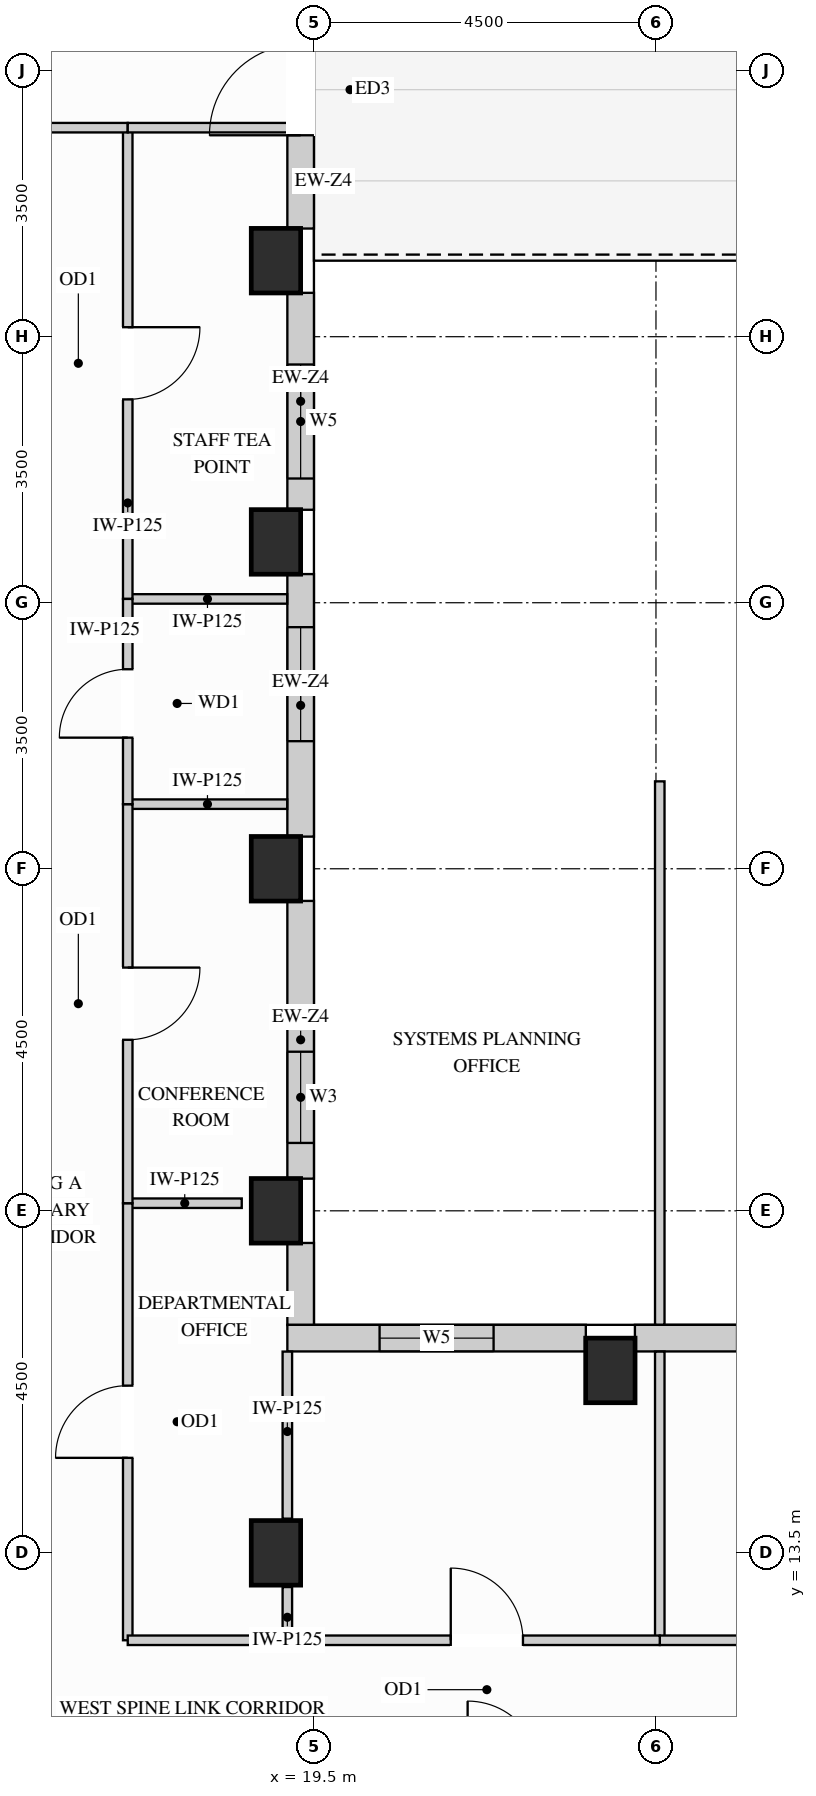
"""IFC4 building model, lengths in metres.
Left out: names, types, materials, properties, quantities, classifications, styles, units other than length and angle.
Written with IfcOpenShell. Run it as: python <this file> out.ifc"""

import sys

from ifc_helpers import new_model, si_unit, direction, frame, frame_2d, origin, origin_2d, place, context, subcontext, project, spatial, rectangle, extrude, source, transform, mapped, element, fill, save


model = new_model("IFC4")
c1 = context("Model", 3, precision=1e-05, world=origin(), true_north=direction((0.0, 1.0)))
c2 = subcontext(c1, "Body", "Model", "MODEL_VIEW")
j1 = project(units=[si_unit("LENGTHUNIT", "METRE"), si_unit("PLANEANGLEUNIT", "RADIAN")], contexts=[c1])
p1 = place(None, origin())
s1 = spatial("IfcSite", under=j1, at=p1, CompositionType="ELEMENT")
p2 = place(p1, origin())
s2 = spatial("IfcBuilding", under=s1, at=p2, CompositionType="ELEMENT")
p3 = place(p2, frame((0.0, 0.0, 237.6)))
s3 = spatial("IfcBuildingStorey", under=s2, at=p3, CompositionType="ELEMENT", Elevation=237.6)
m1 = source(origin(), c2, "Body", "SweptSolid", [
    extrude(rectangle(XDim=0.65, YDim=0.85, at=origin_2d()), origin(), (0.0, 0.0, 1.0), 3.4),
])
for number, where, z_axis, x_axis in (
    (1, (19.0, 13.5, 0.0), (0.0, 0.0, 1.0), (1.0, 0.0, 0.0)),
    (2, (19.0, 18.0, 0.0), (0.0, 0.0, 1.0), (1.0, 0.0, 0.0)),
    (3, (19.0, 22.5, 0.0), (0.0, 0.0, 1.0), (1.0, 0.0, 0.0)),
    (4, (19.0, 26.8, 0.0), (0.0, 0.0, 1.0), (1.0, 0.0, 0.0)),
    (5, (19.0, 30.5, 0.0), (0.0, 0.0, 1.0), (1.0, 0.0, 0.0)),
    (6, (23.4, 15.9, 0.0), (0.0, 0.0, 1.0), (1.0, 0.0, 0.0)),
):
    element("IfcColumn", number, at=place(p3, frame(where, z_axis=z_axis, x_axis=x_axis)), inside=s3, PredefinedType="COLUMN", context=c2, shape_type="MappedRepresentation", body=[
        mapped(m1, transform((0.0, 0.0, 0.0), x_axis=(1.0, 0.0, 0.0), y_axis=(0.0, 1.0, 0.0), z_axis=(0.0, 0.0, 1.0))),
    ])
m2 = source(origin(), c2, "Body", "SweptSolid", [
    extrude(rectangle(XDim=1.079, YDim=0.35, at=frame_2d((0.54, 0.0))), origin(), (0.0, 0.0, 1.0), 2.619),
])
p4 = place(p3, frame((19.325, 16.498, 0.0), z_axis=(0.0, 0.0, 1.0), x_axis=(0.0, 1.0, 0.0)))
e7 = element("IfcWall", 7, at=p4, inside=s3, PredefinedType="SOLIDWALL", context=c2, shape_type="MappedRepresentation", body=[
    mapped(m2, transform((0.0, 0.0, 0.0), x_axis=(1.0, 0.0, 0.0), y_axis=(0.0, 1.0, 0.0), z_axis=(0.0, 0.0, 1.0))),
])
p5 = place(p3, frame((19.325, 18.423, 0.0), z_axis=(0.0, 0.0, 1.0), x_axis=(0.0, 1.0, 0.0)))
e8 = element("IfcWall", 8, at=p5, inside=s3, PredefinedType="SOLIDWALL", context=c2, shape_type="SweptSolid", body=[
    extrude(rectangle(XDim=3.654, YDim=0.35, at=frame_2d((1.827, 0.0))), origin(), (0.0, 0.0, 1.0), 2.619),
])
p6 = place(p5, frame((0.47, 0.0, 0.78)))
e9 = element("IfcOpeningElement", 9, at=p6, cuts=e8, PredefinedType="OPENING", context=c2, shape_type="SweptSolid", body=[
    extrude(rectangle(XDim=1.2, YDim=1.659, at=frame_2d((0.6, 0.83))), frame((0.0, 0.185, 0.0), z_axis=(0.0, -1.0, 0.0), x_axis=(1.0, 0.0, 0.0)), (0.0, 0.0, 1.0), 0.37),
])
p7 = place(p3, frame((19.325, 22.923, 0.0), z_axis=(0.0, 0.0, 1.0), x_axis=(0.0, 1.0, 0.0)))
e10 = element("IfcWall", 10, at=p7, inside=s3, PredefinedType="SOLIDWALL", context=c2, shape_type="SweptSolid", body=[
    extrude(rectangle(XDim=3.454, YDim=0.35, at=frame_2d((1.727, 0.0))), origin(), (0.0, 0.0, 1.0), 2.619),
])
p8 = place(p7, frame((1.256, 0.0, 0.78)))
e11 = element("IfcOpeningElement", 11, at=p8, cuts=e10, PredefinedType="OPENING", context=c2, shape_type="SweptSolid", body=[
    extrude(rectangle(XDim=1.5, YDim=1.659, at=frame_2d((0.75, 0.83))), frame((0.0, 0.185, 0.0), z_axis=(0.0, -1.0, 0.0), x_axis=(1.0, 0.0, 0.0)), (0.0, 0.0, 1.0), 0.37),
])
p9 = place(p3, frame((19.325, 27.223, 0.0), z_axis=(0.0, 0.0, 1.0), x_axis=(0.0, 1.0, 0.0)))
e12 = element("IfcWall", 12, at=p9, inside=s3, PredefinedType="SOLIDWALL", context=c2, shape_type="SweptSolid", body=[
    extrude(rectangle(XDim=2.854, YDim=0.35, at=frame_2d((1.427, 0.0))), origin(), (0.0, 0.0, 1.0), 2.619),
])
p10 = place(p9, frame((0.411, 0.0, 0.78)))
e13 = element("IfcOpeningElement", 13, at=p10, cuts=e12, PredefinedType="OPENING", context=c2, shape_type="SweptSolid", body=[
    extrude(rectangle(XDim=1.5, YDim=1.659, at=frame_2d((0.75, 0.83))), frame((0.0, 0.185, 0.0), z_axis=(0.0, -1.0, 0.0), x_axis=(1.0, 0.0, 0.0)), (0.0, 0.0, 1.0), 0.37),
])
p11 = place(p3, frame((19.325, 30.923, 0.0), z_axis=(0.0, 0.0, 1.0), x_axis=(0.0, 1.0, 0.0)))
e14 = element("IfcWall", 14, at=p11, inside=s3, PredefinedType="SOLIDWALL", context=c2, shape_type="SweptSolid", body=[
    extrude(rectangle(XDim=3.654, YDim=0.35, at=frame_2d((1.827, 0.0))), origin(), (0.0, 0.0, 1.0), 2.619),
])
p12 = place(p11, frame((1.227, 0.0, 0.0)))
e15 = element("IfcOpeningElement", 15, at=p12, cuts=e14, PredefinedType="OPENING", context=c2, shape_type="SweptSolid", body=[
    extrude(rectangle(XDim=1.2, YDim=2.15, at=frame_2d((0.6, 1.075))), frame((0.0, 0.185, 0.0), z_axis=(0.0, -1.0, 0.0), x_axis=(1.0, 0.0, 0.0)), (0.0, 0.0, 1.0), 0.37),
])
p13 = place(p3, frame((30.177, 16.325, 0.0), z_axis=(0.0, 0.0, 1.0), x_axis=(-1.0, 0.0, 0.0)))
e16 = element("IfcWall", 16, at=p13, inside=s3, PredefinedType="SOLIDWALL", context=c2, shape_type="SweptSolid", body=[
    extrude(rectangle(XDim=6.454, YDim=0.35, at=frame_2d((3.227, 0.0))), origin(), (0.0, 0.0, 1.0), 3.385),
])
p14 = place(p13, frame((1.344, 0.0, 0.78)))
e17 = element("IfcOpeningElement", 17, at=p14, cuts=e16, PredefinedType="OPENING", context=c2, shape_type="SweptSolid", body=[
    extrude(rectangle(XDim=1.5, YDim=2.0, at=frame_2d((0.75, 1.0))), frame((0.0, 0.185, 0.0), z_axis=(0.0, -1.0, 0.0), x_axis=(1.0, 0.0, 0.0)), (0.0, 0.0, 1.0), 0.37),
])
p15 = place(p13, frame((3.61, 0.0, 0.78)))
e18 = element("IfcOpeningElement", 18, at=p15, cuts=e16, PredefinedType="OPENING", context=c2, shape_type="SweptSolid", body=[
    extrude(rectangle(XDim=1.5, YDim=2.0, at=frame_2d((0.75, 1.0))), frame((0.0, 0.185, 0.0), z_axis=(0.0, -1.0, 0.0), x_axis=(1.0, 0.0, 0.0)), (0.0, 0.0, 1.0), 0.37),
])
p16 = place(p3, frame((23.077, 16.325, 0.0), z_axis=(0.0, 0.0, 1.0), x_axis=(-1.0, 0.0, 0.0)))
e19 = element("IfcWall", 19, at=p16, inside=s3, PredefinedType="SOLIDWALL", context=c2, shape_type="SweptSolid", body=[
    extrude(rectangle(XDim=3.927, YDim=0.35, at=frame_2d((1.963, 0.0))), origin(), (0.0, 0.0, 1.0), 3.385),
])
p17 = place(p16, frame((1.213, 0.0, 0.78)))
e20 = element("IfcOpeningElement", 20, at=p17, cuts=e19, PredefinedType="OPENING", context=c2, shape_type="SweptSolid", body=[
    extrude(rectangle(XDim=1.5, YDim=2.0, at=frame_2d((0.75, 1.0))), frame((0.0, 0.185, 0.0), z_axis=(0.0, -1.0, 0.0), x_axis=(1.0, 0.0, 0.0)), (0.0, 0.0, 1.0), 0.37),
])
m3 = source(origin(), c2, "Body", "SweptSolid", [
    extrude(rectangle(XDim=1.5, YDim=0.125, at=frame_2d((0.75, 0.0))), origin(), (0.0, 0.0, 1.0), 2.773),
])
p18 = place(p3, frame((17.05, 18.1, 0.0), z_axis=(0.0, 0.0, 1.0), x_axis=(1.0, 0.0, 0.0)))
e21 = element("IfcWall", 21, at=p18, inside=s3, PredefinedType="PARTITIONING", context=c2, shape_type="MappedRepresentation", body=[
    mapped(m3, transform((0.0, 0.0, 0.0), x_axis=(1.0, 0.0, 0.0), y_axis=(0.0, 1.0, 0.0), z_axis=(0.0, 0.0, 1.0))),
])
m4 = source(origin(), c2, "Body", "SweptSolid", [
    extrude(rectangle(XDim=2.098, YDim=0.125, at=frame_2d((1.049, 0.0))), origin(), (0.0, 0.0, 1.0), 3.385),
])
for number, where, z_axis, x_axis in (
    (22, (17.05, 23.35, 0.0), (0.0, 0.0, 1.0), (1.0, 0.0, 0.0)),
    (23, (17.05, 26.05, 0.0), (0.0, 0.0, 1.0), (1.0, 0.0, 0.0)),
):
    element("IfcWall", number, at=place(p3, frame(where, z_axis=z_axis, x_axis=x_axis)), inside=s3, PredefinedType="PARTITIONING", context=c2, shape_type="MappedRepresentation", body=[
        mapped(m4, transform((0.0, 0.0, 0.0), x_axis=(1.0, 0.0, 0.0), y_axis=(0.0, 1.0, 0.0), z_axis=(0.0, 0.0, 1.0))),
    ])
m5 = source(origin(), c2, "Body", "SweptSolid", [
    extrude(rectangle(XDim=0.7, YDim=0.125, at=frame_2d((0.35, 0.0))), origin(), (0.0, 0.0, 1.0), 2.773),
])
p19 = place(p3, frame((19.15, 12.35, 0.0), z_axis=(0.0, 0.0, 1.0), x_axis=(0.0, 1.0, 0.0)))
e24 = element("IfcWall", 24, at=p19, inside=s3, PredefinedType="PARTITIONING", context=c2, shape_type="MappedRepresentation", body=[
    mapped(m5, transform((0.0, 0.0, 0.0), x_axis=(1.0, 0.0, 0.0), y_axis=(0.0, 1.0, 0.0), z_axis=(0.0, 0.0, 1.0))),
])
m6 = source(origin(), c2, "Body", "SweptSolid", [
    extrude(rectangle(XDim=2.198, YDim=0.125, at=frame_2d((1.099, 0.0))), origin(), (0.0, 0.0, 1.0), 2.619),
])
p20 = place(p3, frame((19.15, 13.95, 0.0), z_axis=(0.0, 0.0, 1.0), x_axis=(0.0, 1.0, 0.0)))
e25 = element("IfcWall", 25, at=p20, inside=s3, PredefinedType="PARTITIONING", context=c2, shape_type="MappedRepresentation", body=[
    mapped(m6, transform((0.0, 0.0, 0.0), x_axis=(1.0, 0.0, 0.0), y_axis=(0.0, 1.0, 0.0), z_axis=(0.0, 0.0, 1.0))),
])
p21 = place(p3, frame((17.05, 12.35, 0.0), z_axis=(0.0, 0.0, 1.0), x_axis=(0.0, 1.0, 0.0)))
e26 = element("IfcWall", 26, at=p21, inside=s3, PredefinedType="PARTITIONING", context=c2, shape_type="SweptSolid", body=[
    extrude(rectangle(XDim=5.75, YDim=0.125, at=frame_2d((2.875, 0.0))), origin(), (0.0, 0.0, 1.0), 3.385),
])
p22 = place(p21, frame((2.4, 0.0, 0.0)))
e27 = element("IfcOpeningElement", 27, at=p22, cuts=e26, PredefinedType="OPENING", context=c2, shape_type="SweptSolid", body=[
    extrude(rectangle(XDim=0.95, YDim=2.15, at=frame_2d((0.475, 1.075))), frame((0.0, 0.073, 0.0), z_axis=(0.0, -1.0, 0.0), x_axis=(1.0, 0.0, 0.0)), (0.0, 0.0, 1.0), 0.145),
])
p23 = place(p3, frame((17.05, 18.1, 0.0), z_axis=(0.0, 0.0, 1.0), x_axis=(0.0, 1.0, 0.0)))
e28 = element("IfcWall", 28, at=p23, inside=s3, PredefinedType="PARTITIONING", context=c2, shape_type="SweptSolid", body=[
    extrude(rectangle(XDim=5.25, YDim=0.125, at=frame_2d((2.625, 0.0))), origin(), (0.0, 0.0, 1.0), 3.385),
])
p24 = place(p23, frame((2.15, 0.0, 0.0)))
e29 = element("IfcOpeningElement", 29, at=p24, cuts=e28, PredefinedType="OPENING", context=c2, shape_type="SweptSolid", body=[
    extrude(rectangle(XDim=0.95, YDim=2.15, at=frame_2d((0.475, 1.075))), frame((0.0, 0.073, 0.0), z_axis=(0.0, -1.0, 0.0), x_axis=(1.0, 0.0, 0.0)), (0.0, 0.0, 1.0), 0.145),
])
p25 = place(p3, frame((17.05, 26.05, 0.0), z_axis=(0.0, 0.0, 1.0), x_axis=(0.0, 1.0, 0.0)))
e30 = element("IfcWall", 30, at=p25, inside=s3, PredefinedType="PARTITIONING", context=c2, shape_type="SweptSolid", body=[
    extrude(rectangle(XDim=6.2, YDim=0.125, at=frame_2d((3.1, 0.0))), origin(), (0.0, 0.0, 1.0), 3.385),
])
p26 = place(p25, frame((2.625, 0.0, 0.0)))
e31 = element("IfcOpeningElement", 31, at=p26, cuts=e30, PredefinedType="OPENING", context=c2, shape_type="SweptSolid", body=[
    extrude(rectangle(XDim=0.95, YDim=2.15, at=frame_2d((0.475, 1.075))), frame((0.0, 0.073, 0.0), z_axis=(0.0, -1.0, 0.0), x_axis=(1.0, 0.0, 0.0)), (0.0, 0.0, 1.0), 0.145),
])
p27 = place(p3, frame((17.05, 23.35, 0.0), z_axis=(0.0, 0.0, 1.0), x_axis=(0.0, 1.0, 0.0)))
e32 = element("IfcWall", 32, at=p27, inside=s3, PredefinedType="PARTITIONING", context=c2, shape_type="SweptSolid", body=[
    extrude(rectangle(XDim=2.7, YDim=0.125, at=frame_2d((1.35, 0.0))), origin(), (0.0, 0.0, 1.0), 3.385),
])
p28 = place(p27, frame((0.875, 0.0, 0.0)))
e33 = element("IfcOpeningElement", 33, at=p28, cuts=e32, PredefinedType="OPENING", context=c2, shape_type="SweptSolid", body=[
    extrude(rectangle(XDim=0.9, YDim=2.15, at=frame_2d((0.45, 1.075))), frame((0.0, 0.073, 0.0), z_axis=(0.0, -1.0, 0.0), x_axis=(1.0, 0.0, 0.0)), (0.0, 0.0, 1.0), 0.145),
])
p29 = place(p3, frame((11.916, 32.25, 0.0), z_axis=(0.0, 0.0, 1.0), x_axis=(1.0, 0.0, 0.0)))
e34 = element("IfcWall", 34, at=p29, inside=s3, PredefinedType="PARTITIONING", context=c2, shape_type="SweptSolid", body=[
    extrude(rectangle(XDim=5.134, YDim=0.125, at=frame_2d((2.567, 0.0))), origin(), (0.0, 0.0, 1.0), 3.385),
])
p30 = place(p29, frame((2.092, 0.0, 0.0)))
e35 = element("IfcOpeningElement", 35, at=p30, cuts=e34, PredefinedType="OPENING", context=c2, shape_type="SweptSolid", body=[
    extrude(rectangle(XDim=0.95, YDim=2.15, at=frame_2d((0.475, 1.075))), frame((0.0, 0.073, 0.0), z_axis=(0.0, -1.0, 0.0), x_axis=(1.0, 0.0, 0.0)), (0.0, 0.0, 1.0), 0.145),
])
p31 = place(p3, frame((17.05, 32.25, 0.0), z_axis=(0.0, 0.0, 1.0), x_axis=(1.0, 0.0, 0.0)))
e36 = element("IfcWall", 36, at=p31, inside=s3, PredefinedType="PARTITIONING", context=c2, shape_type="MappedRepresentation", body=[
    mapped(m4, transform((0.0, 0.0, 0.0), x_axis=(1.0, 0.0, 0.0), y_axis=(0.0, 1.0, 0.0), z_axis=(0.0, 0.0, 1.0))),
])
m7 = source(origin(), c2, "Body", "SweptSolid", [
    extrude(rectangle(XDim=3.798, YDim=0.125, at=frame_2d((1.899, 0.0))), origin(), (0.0, 0.0, 1.0), 3.385),
])
p32 = place(p3, frame((24.05, 12.35, 0.0), z_axis=(0.0, 0.0, 1.0), x_axis=(0.0, 1.0, 0.0)))
e37 = element("IfcWall", 37, at=p32, inside=s3, PredefinedType="PARTITIONING", context=c2, shape_type="MappedRepresentation", body=[
    mapped(m7, transform((0.0, 0.0, 0.0), x_axis=(1.0, 0.0, 0.0), y_axis=(0.0, 1.0, 0.0), z_axis=(0.0, 0.0, 1.0))),
])
m8 = source(origin(), c2, "Body", "SweptSolid", [
    extrude(rectangle(XDim=7.148, YDim=0.125, at=frame_2d((3.574, 0.0))), origin(), (0.0, 0.0, 1.0), 3.385),
])
p33 = place(p3, frame((24.05, 16.502, 0.0), z_axis=(0.0, 0.0, 1.0), x_axis=(0.0, 1.0, 0.0)))
e38 = element("IfcWall", 38, at=p33, inside=s3, PredefinedType="PARTITIONING", context=c2, shape_type="MappedRepresentation", body=[
    mapped(m8, transform((0.0, 0.0, 0.0), x_axis=(1.0, 0.0, 0.0), y_axis=(0.0, 1.0, 0.0), z_axis=(0.0, 0.0, 1.0))),
])
p34 = place(p3, frame((24.05, 12.35, 0.0), z_axis=(0.0, 0.0, 1.0), x_axis=(1.0, 0.0, 0.0)))
e39 = element("IfcWall", 39, at=p34, inside=s3, PredefinedType="PARTITIONING", context=c2, shape_type="SweptSolid", body=[
    extrude(rectangle(XDim=5.8, YDim=0.125, at=frame_2d((2.9, 0.0))), origin(), (0.0, 0.0, 1.0), 3.385),
])
p35 = place(p34, frame((2.425, 0.0, 0.0)))
e40 = element("IfcOpeningElement", 40, at=p35, cuts=e39, PredefinedType="OPENING", context=c2, shape_type="SweptSolid", body=[
    extrude(rectangle(XDim=0.95, YDim=2.15, at=frame_2d((0.475, 1.075))), frame((0.0, 0.073, 0.0), z_axis=(0.0, -1.0, 0.0), x_axis=(1.0, 0.0, 0.0)), (0.0, 0.0, 1.0), 0.145),
])
m9 = source(origin(), c2, "Body", "SweptSolid", [
    extrude(rectangle(XDim=2.45, YDim=0.125, at=frame_2d((1.225, 0.0))), origin(), (0.0, 0.0, 1.0), 3.385),
])
p36 = place(p3, frame((17.05, 12.35, 0.0), z_axis=(0.0, 0.0, 1.0), x_axis=(1.0, 0.0, 0.0)))
e41 = element("IfcWall", 41, at=p36, inside=s3, PredefinedType="PARTITIONING", context=c2, shape_type="MappedRepresentation", body=[
    mapped(m9, transform((0.0, 0.0, 0.0), x_axis=(1.0, 0.0, 0.0), y_axis=(0.0, 1.0, 0.0), z_axis=(0.0, 0.0, 1.0))),
])
p37 = place(p3, frame((19.5, 12.35, 0.0), z_axis=(0.0, 0.0, 1.0), x_axis=(1.0, 0.0, 0.0)))
e42 = element("IfcWall", 42, at=p37, inside=s3, PredefinedType="PARTITIONING", context=c2, shape_type="SweptSolid", body=[
    extrude(rectangle(XDim=4.55, YDim=0.125, at=frame_2d((2.275, 0.0))), origin(), (0.0, 0.0, 1.0), 3.385),
])
p38 = place(p37, frame((1.8, 0.0, 0.0)))
e43 = element("IfcOpeningElement", 43, at=p38, cuts=e42, PredefinedType="OPENING", context=c2, shape_type="SweptSolid", body=[
    extrude(rectangle(XDim=0.95, YDim=2.15, at=frame_2d((0.475, 1.075))), frame((0.0, 0.073, 0.0), z_axis=(0.0, -1.0, 0.0), x_axis=(1.0, 0.0, 0.0)), (0.0, 0.0, 1.0), 0.145),
])
m10 = source(origin(), c2, "Body", "SweptSolid", [
    extrude(rectangle(XDim=1.2, YDim=2.15, at=frame_2d((0.6, 1.075))), frame((0.0, 0.025, 0.0), z_axis=(0.0, -1.0, 0.0), x_axis=(1.0, 0.0, 0.0)), (0.0, 0.0, 1.0), 0.05),
])
p39 = place(p12, frame((1.2, 0.0, 0.0), z_axis=(0.0, 0.0, 1.0), x_axis=(-1.0, 0.0, 0.0)))
e44 = element("IfcDoor", 44, at=p39, inside=s3, OperationType="SINGLE_SWING_LEFT", PredefinedType="DOOR", context=c2, shape_type="MappedRepresentation", body=[
    mapped(m10, transform((0.0, 0.0, 0.0), x_axis=(1.0, 0.0, 0.0), y_axis=(0.0, 1.0, 0.0), z_axis=(0.0, 0.0, 1.0))),
])
fill(e15, e44)
m11 = source(origin(), c2, "Body", "SweptSolid", [
    extrude(rectangle(XDim=0.95, YDim=2.15, at=frame_2d((0.475, 1.075))), frame((0.0, 0.025, 0.0), z_axis=(0.0, -1.0, 0.0), x_axis=(1.0, 0.0, 0.0)), (0.0, 0.0, 1.0), 0.05),
])
p40 = place(p22, origin())
e45 = element("IfcDoor", 45, at=p40, inside=s3, OperationType="SINGLE_SWING_LEFT", PredefinedType="DOOR", context=c2, shape_type="MappedRepresentation", body=[
    mapped(m11, transform((0.0, 0.0, 0.0), x_axis=(1.0, 0.0, 0.0), y_axis=(0.0, 1.0, 0.0), z_axis=(0.0, 0.0, 1.0))),
])
fill(e27, e45)
p41 = place(p24, origin())
e46 = element("IfcDoor", 46, at=p41, inside=s3, OperationType="SINGLE_SWING_RIGHT", PredefinedType="DOOR", context=c2, shape_type="MappedRepresentation", body=[
    mapped(m11, transform((0.0, 0.0, 0.0), x_axis=(1.0, 0.0, 0.0), y_axis=(0.0, 1.0, 0.0), z_axis=(0.0, 0.0, 1.0))),
])
fill(e29, e46)
p42 = place(p26, origin())
e47 = element("IfcDoor", 47, at=p42, inside=s3, OperationType="SINGLE_SWING_RIGHT", PredefinedType="DOOR", context=c2, shape_type="MappedRepresentation", body=[
    mapped(m11, transform((0.0, 0.0, 0.0), x_axis=(1.0, 0.0, 0.0), y_axis=(0.0, 1.0, 0.0), z_axis=(0.0, 0.0, 1.0))),
])
fill(e31, e47)
p43 = place(p38, origin())
e48 = element("IfcDoor", 48, at=p43, inside=s3, OperationType="SINGLE_SWING_LEFT", PredefinedType="DOOR", context=c2, shape_type="MappedRepresentation", body=[
    mapped(m11, transform((0.0, 0.0, 0.0), x_axis=(1.0, 0.0, 0.0), y_axis=(0.0, 1.0, 0.0), z_axis=(0.0, 0.0, 1.0))),
])
fill(e43, e48)
m12 = source(origin(), c2, "Body", "SweptSolid", [
    extrude(rectangle(XDim=0.9, YDim=2.15, at=frame_2d((0.45, 1.075))), frame((0.0, 0.025, 0.0), z_axis=(0.0, -1.0, 0.0), x_axis=(1.0, 0.0, 0.0)), (0.0, 0.0, 1.0), 0.05),
])
p44 = place(p28, origin())
e49 = element("IfcDoor", 49, at=p44, inside=s3, OperationType="SINGLE_SWING_LEFT", PredefinedType="DOOR", context=c2, shape_type="MappedRepresentation", body=[
    mapped(m12, transform((0.0, 0.0, 0.0), x_axis=(1.0, 0.0, 0.0), y_axis=(0.0, 1.0, 0.0), z_axis=(0.0, 0.0, 1.0))),
])
fill(e33, e49)
m13 = source(origin(), c2, "Body", "SweptSolid", [
    extrude(rectangle(XDim=1.2, YDim=1.659, at=frame_2d((0.6, 0.83))), frame((0.0, 0.03, 0.0), z_axis=(0.0, -1.0, 0.0), x_axis=(1.0, 0.0, 0.0)), (0.0, 0.0, 1.0), 0.06),
])
p45 = place(p6, origin())
e50 = element("IfcWindow", 50, at=p45, inside=s3, PartitioningType="SINGLE_PANEL", PredefinedType="WINDOW", context=c2, shape_type="MappedRepresentation", body=[
    mapped(m13, transform((0.0, 0.0, 0.0), x_axis=(1.0, 0.0, 0.0), y_axis=(0.0, 1.0, 0.0), z_axis=(0.0, 0.0, 1.0))),
])
fill(e9, e50)
m14 = source(origin(), c2, "Body", "SweptSolid", [
    extrude(rectangle(XDim=1.5, YDim=1.659, at=frame_2d((0.75, 0.83))), frame((0.0, 0.03, 0.0), z_axis=(0.0, -1.0, 0.0), x_axis=(1.0, 0.0, 0.0)), (0.0, 0.0, 1.0), 0.06),
])
p46 = place(p8, origin())
e51 = element("IfcWindow", 51, at=p46, inside=s3, PartitioningType="SINGLE_PANEL", PredefinedType="WINDOW", context=c2, shape_type="MappedRepresentation", body=[
    mapped(m14, transform((0.0, 0.0, 0.0), x_axis=(1.0, 0.0, 0.0), y_axis=(0.0, 1.0, 0.0), z_axis=(0.0, 0.0, 1.0))),
])
fill(e11, e51)
p47 = place(p10, origin())
e52 = element("IfcWindow", 52, at=p47, inside=s3, PartitioningType="SINGLE_PANEL", PredefinedType="WINDOW", context=c2, shape_type="MappedRepresentation", body=[
    mapped(m14, transform((0.0, 0.0, 0.0), x_axis=(1.0, 0.0, 0.0), y_axis=(0.0, 1.0, 0.0), z_axis=(0.0, 0.0, 1.0))),
])
fill(e13, e52)
m15 = source(origin(), c2, "Body", "SweptSolid", [
    extrude(rectangle(XDim=1.5, YDim=2.0, at=frame_2d((0.75, 1.0))), frame((0.0, 0.03, 0.0), z_axis=(0.0, -1.0, 0.0), x_axis=(1.0, 0.0, 0.0)), (0.0, 0.0, 1.0), 0.06),
])
p48 = place(p17, origin())
e53 = element("IfcWindow", 53, at=p48, inside=s3, PartitioningType="SINGLE_PANEL", PredefinedType="WINDOW", context=c2, shape_type="MappedRepresentation", body=[
    mapped(m15, transform((0.0, 0.0, 0.0), x_axis=(1.0, 0.0, 0.0), y_axis=(0.0, 1.0, 0.0), z_axis=(0.0, 0.0, 1.0))),
])
fill(e20, e53)
save(model, sys.argv[1])
